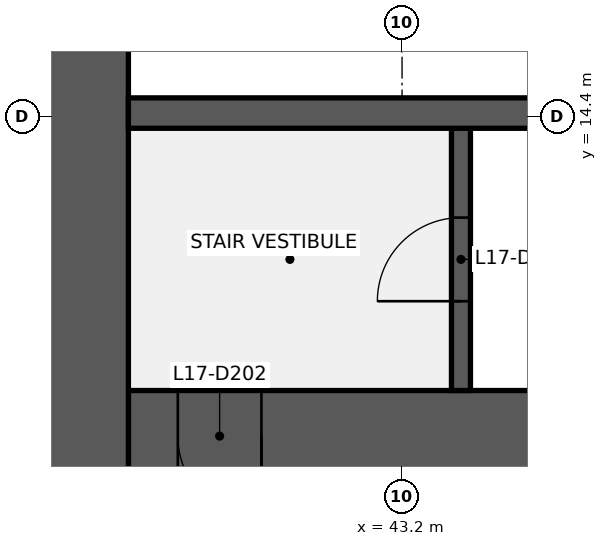
"""IFC4 building model, lengths in metres.
Left out: names, types, materials, properties, quantities, classifications, styles, units other than length and angle.
Written with IfcOpenShell. Run it as: python <this file> out.ifc"""

import sys

from ifc_helpers import new_model, si_unit, direction, frame, frame_2d, origin, place, context, subcontext, project, spatial, rectangle, extrude, element, fill, save


model = new_model("IFC4")
c1 = context("Model", 3, precision=1e-05, world=origin(), true_north=direction((0.0, 1.0)))
c2 = subcontext(c1, "Body", "Model", "MODEL_VIEW")
j1 = project(units=[si_unit("LENGTHUNIT", "METRE"), si_unit("PLANEANGLEUNIT", "RADIAN")], contexts=[c1])
p1 = place(None, origin())
s1 = spatial("IfcSite", under=j1, at=p1, CompositionType="ELEMENT")
p2 = place(p1, origin())
s2 = spatial("IfcBuilding", under=s1, at=p2, CompositionType="ELEMENT")
p3 = place(p2, frame((0.0, 0.0, 79.0)))
s3 = spatial("IfcBuildingStorey", under=s2, at=p3, CompositionType="ELEMENT", Elevation=79.0)
p4 = place(p3, frame((52.8, 10.2, 0.0), z_axis=(0.0, 0.0, 1.0), x_axis=(-1.0, 0.0, 0.0)))
e1 = element("IfcWall", 1, at=p4, inside=s3, PredefinedType="SHEAR", context=c2, shape_type="SweptSolid", body=[
    extrude(rectangle(XDim=13.2, YDim=1.2, at=frame_2d((6.6, 0.0))), origin(), (0.0, 0.0, 1.0), 3.84),
])
p5 = place(p4, frame((11.45, 0.0, 0.0)))
e2 = element("IfcOpeningElement", 2, at=p5, cuts=e1, PredefinedType="OPENING", context=c2, shape_type="SweptSolid", body=[
    extrude(rectangle(XDim=1.1, YDim=2.1, at=frame_2d((0.55, 1.05))), frame((0.0, 0.61, 0.0), z_axis=(0.0, -1.0, 0.0), x_axis=(1.0, 0.0, 0.0)), (0.0, 0.0, 1.0), 1.22),
])
p6 = place(p3, frame((39.0, 9.6, 0.0), z_axis=(0.0, 0.0, 1.0), x_axis=(0.0, 1.0, 0.0)))
e3 = element("IfcWall", 3, at=p6, inside=s3, PredefinedType="SHEAR", context=c2, shape_type="SweptSolid", body=[
    extrude(rectangle(XDim=28.8, YDim=1.2, at=frame_2d((14.4, 0.0))), origin(), (0.0, 0.0, 1.0), 3.84),
])
p7 = place(p6, frame((8.7, 0.0, 0.0)))
e4 = element("IfcOpeningElement", 4, at=p7, cuts=e3, PredefinedType="OPENING", context=c2, shape_type="SweptSolid", body=[
    extrude(rectangle(XDim=1.8, YDim=2.1, at=frame_2d((0.9, 1.05))), frame((0.0, 0.61, 0.0), z_axis=(0.0, -1.0, 0.0), x_axis=(1.0, 0.0, 0.0)), (0.0, 0.0, 1.0), 1.22),
])
p8 = place(p6, frame((18.3, 0.0, 0.0)))
e5 = element("IfcOpeningElement", 5, at=p8, cuts=e3, PredefinedType="OPENING", context=c2, shape_type="SweptSolid", body=[
    extrude(rectangle(XDim=1.8, YDim=2.1, at=frame_2d((0.9, 1.05))), frame((0.0, 0.61, 0.0), z_axis=(0.0, -1.0, 0.0), x_axis=(1.0, 0.0, 0.0)), (0.0, 0.0, 1.0), 1.22),
])
p9 = place(p3, frame((43.975, 10.8, 0.0), z_axis=(0.0, 0.0, 1.0), x_axis=(0.0, 1.0, 0.0)))
e6 = element("IfcWall", 6, at=p9, inside=s3, PredefinedType="SHEAR", context=c2, shape_type="SweptSolid", body=[
    extrude(rectangle(XDim=3.45, YDim=0.25, at=frame_2d((1.725, 0.0))), origin(), (0.0, 0.0, 1.0), 3.84),
])
p10 = place(p9, frame((1.175, 0.0, 0.0)))
e7 = element("IfcOpeningElement", 7, at=p10, cuts=e6, PredefinedType="OPENING", context=c2, shape_type="SweptSolid", body=[
    extrude(rectangle(XDim=1.1, YDim=2.1, at=frame_2d((0.55, 1.05))), frame((0.0, 0.135, 0.0), z_axis=(0.0, -1.0, 0.0), x_axis=(1.0, 0.0, 0.0)), (0.0, 0.0, 1.0), 0.27),
])
p11 = place(p3, frame((39.6, 14.45, 0.0), z_axis=(0.0, 0.0, 1.0), x_axis=(1.0, 0.0, 0.0)))
e8 = element("IfcWall", 8, at=p11, inside=s3, PredefinedType="SHEAR", context=c2, shape_type="SweptSolid", body=[
    extrude(rectangle(XDim=16.8, YDim=0.4, at=frame_2d((8.4, 0.0))), origin(), (0.0, 0.0, 1.0), 3.84),
])
p12 = place(p10, origin())
e9 = element("IfcDoor", 9, at=p12, inside=s3, OperationType="SINGLE_SWING_LEFT", PredefinedType="DOOR", context=c2, shape_type="SweptSolid", body=[
    extrude(rectangle(XDim=1.1, YDim=2.1, at=frame_2d((0.55, 1.05))), frame((0.0, 0.025, 0.0), z_axis=(0.0, -1.0, 0.0), x_axis=(1.0, 0.0, 0.0)), (0.0, 0.0, 1.0), 0.05),
])
fill(e7, e9)
p13 = place(p5, origin())
e10 = element("IfcDoor", 10, at=p13, inside=s3, OperationType="SINGLE_SWING_LEFT", PredefinedType="DOOR", context=c2, shape_type="SweptSolid", body=[
    extrude(rectangle(XDim=1.1, YDim=2.1, at=frame_2d((0.55, 1.05))), frame((0.0, 0.025, 0.0), z_axis=(0.0, -1.0, 0.0), x_axis=(1.0, 0.0, 0.0)), (0.0, 0.0, 1.0), 0.05),
])
fill(e2, e10)
save(model, sys.argv[1])
